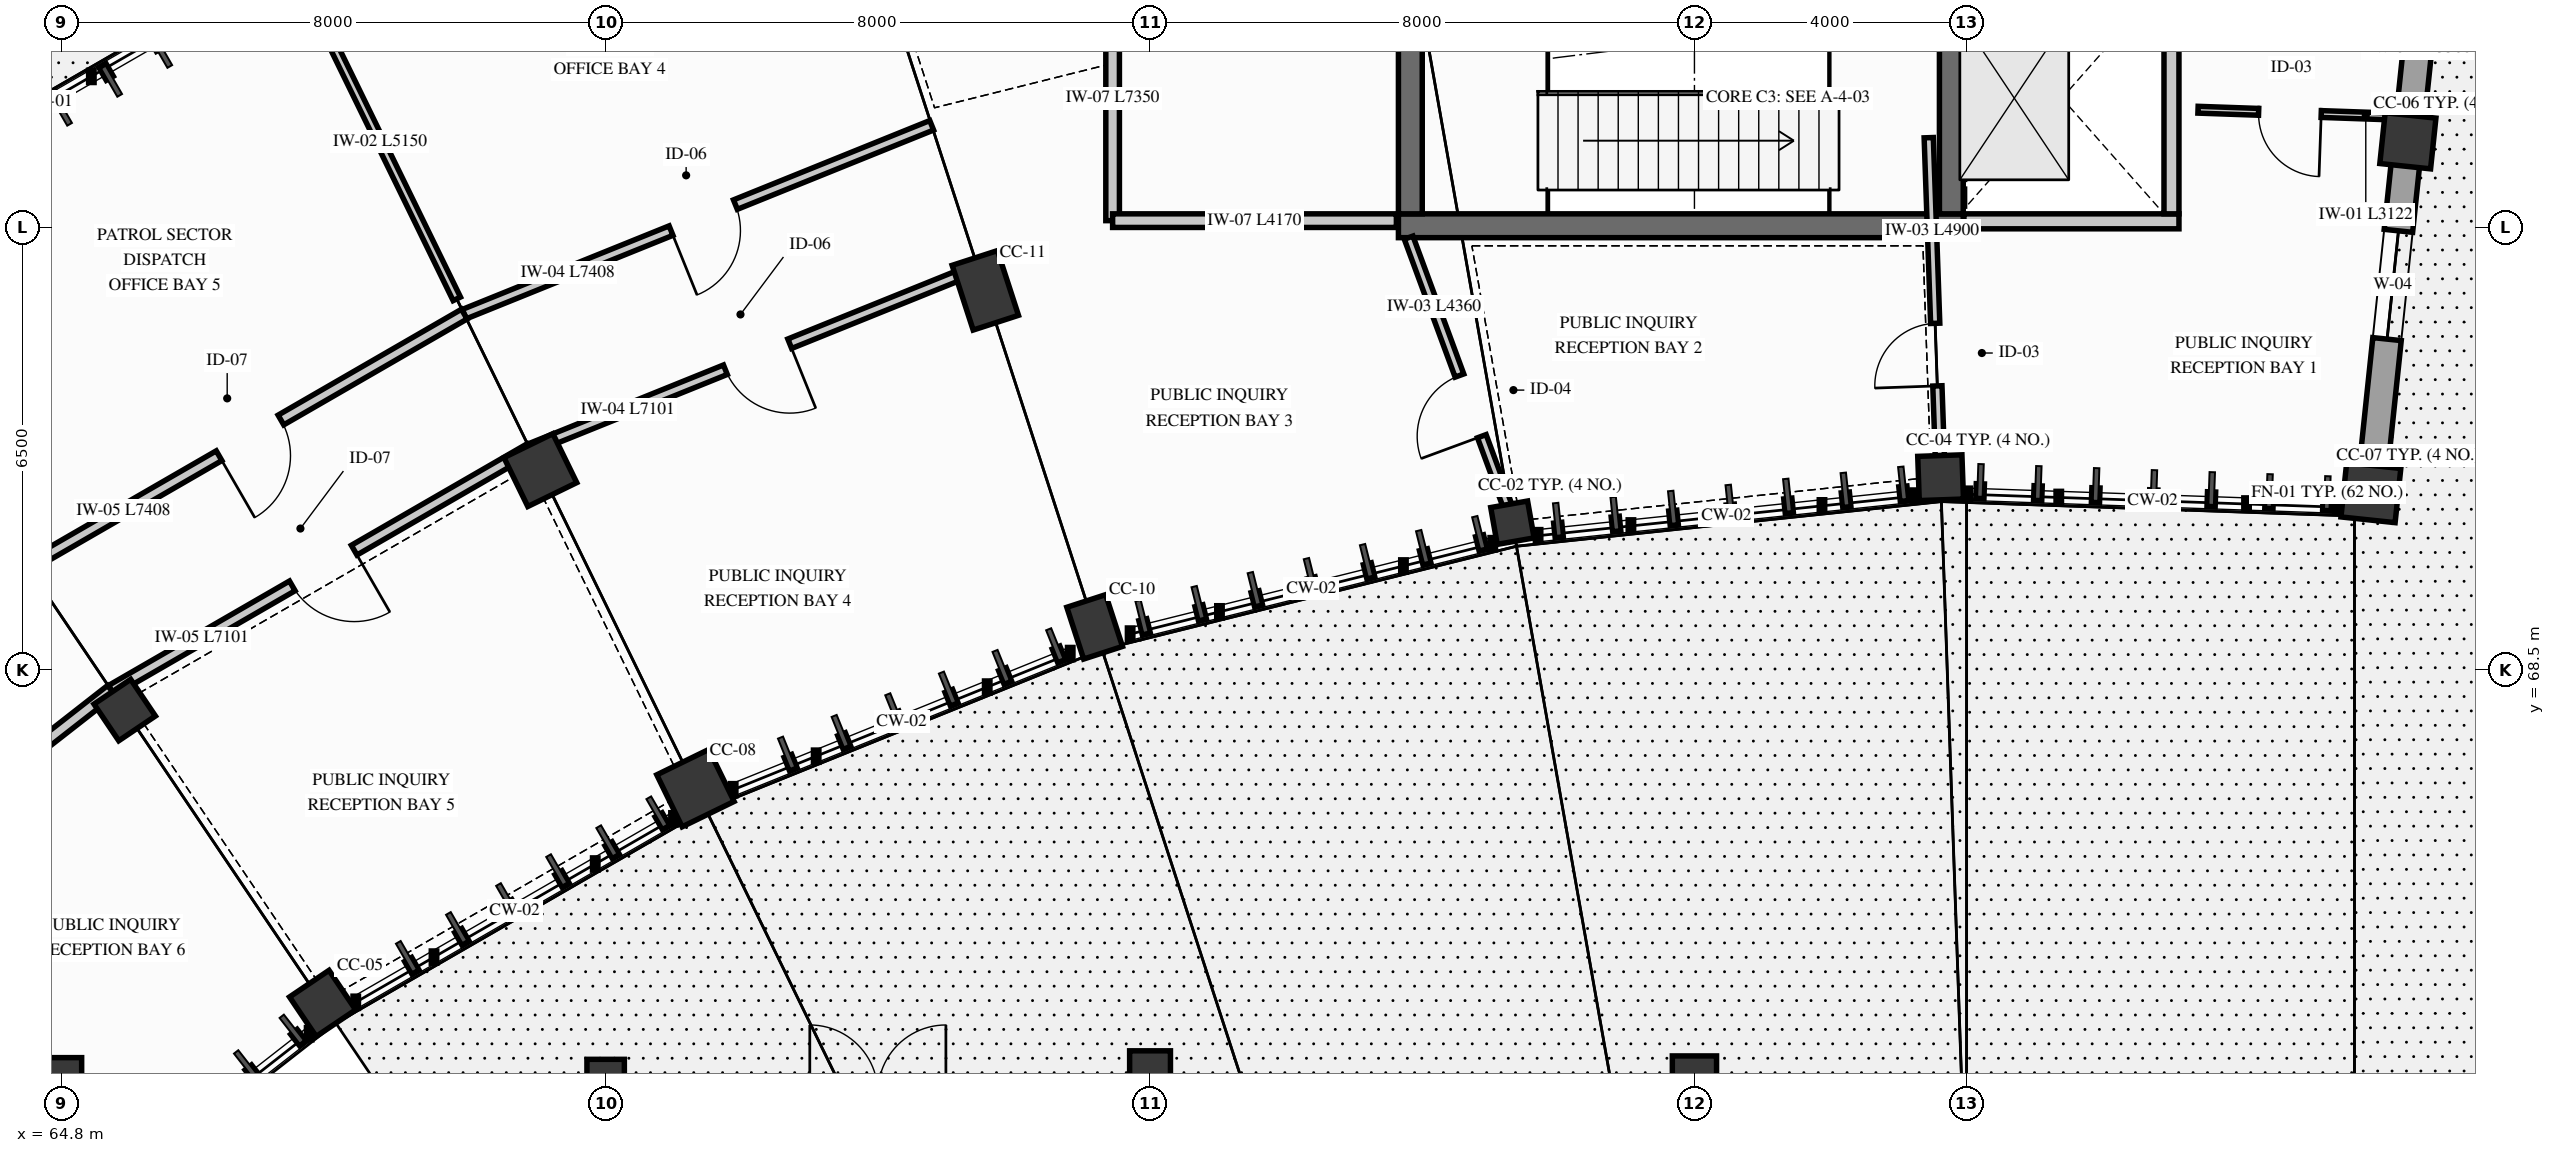
"""IFC4 building model, lengths in metres.
Left out: names, types, materials, properties, quantities, classifications, styles, units other than length and angle.
Written with IfcOpenShell. Run it as: python <this file> out.ifc"""

import sys

from ifc_helpers import new_model, si_unit, direction, frame, frame_2d, origin, origin_2d, place, context, subcontext, project, spatial, rectangle, extrude, element, fill, save


model = new_model("IFC4")
c1 = context("Model", 3, precision=1e-05, world=origin(), true_north=direction((0.0, 1.0)))
c2 = subcontext(c1, "Body", "Model", "MODEL_VIEW")
j1 = project(units=[si_unit("LENGTHUNIT", "METRE"), si_unit("PLANEANGLEUNIT", "RADIAN")], contexts=[c1])
p1 = place(None, origin())
s1 = spatial("IfcSite", under=j1, at=p1, CompositionType="ELEMENT")
p2 = place(p1, origin())
s2 = spatial("IfcBuilding", under=s1, at=p2, CompositionType="ELEMENT")
p3 = place(p2, origin())
s3 = spatial("IfcBuildingStorey", under=s2, at=p3, CompositionType="ELEMENT", Elevation=0.0)
p4 = place(p3, frame((84.45, 75.025, 0.0), z_axis=(0.0, 0.0, 1.0), x_axis=(1.0, 0.0, 0.0)))
e1 = element("IfcWall", 1, at=p4, inside=s3, PredefinedType="SHEAR", context=c2, shape_type="SweptSolid", body=[
    extrude(rectangle(XDim=8.3, YDim=0.35, at=frame_2d((4.15, 0.0))), origin(), (0.0, 0.0, 1.0), 4.88),
])
p5 = place(p3, frame((84.625, 75.2, 0.0), z_axis=(0.0, 0.0, 1.0), x_axis=(0.0, 1.0, 0.0)))
e2 = element("IfcWall", 2, at=p5, inside=s3, PredefinedType="SHEAR", context=c2, shape_type="SweptSolid", body=[
    extrude(rectangle(XDim=6.8, YDim=0.35, at=frame_2d((3.4, 0.0))), origin(), (0.0, 0.0, 1.0), 4.88),
])
p6 = place(p5, frame((2.6, 0.0, 0.0)))
e3 = element("IfcOpeningElement", 3, at=p6, cuts=e2, PredefinedType="OPENING", context=c2, shape_type="SweptSolid", body=[
    extrude(rectangle(XDim=1.25, YDim=2.2, at=frame_2d((0.625, 1.1))), frame((0.0, 0.185, 0.0), z_axis=(0.0, -1.0, 0.0), x_axis=(1.0, 0.0, 0.0)), (0.0, 0.0, 1.0), 0.37),
])
p7 = place(p3, frame((92.575, 75.2, 0.0), z_axis=(0.0, 0.0, 1.0), x_axis=(0.0, 1.0, 0.0)))
e4 = element("IfcWall", 4, at=p7, inside=s3, PredefinedType="SHEAR", context=c2, shape_type="SweptSolid", body=[
    extrude(rectangle(XDim=6.8, YDim=0.35, at=frame_2d((3.4, 0.0))), origin(), (0.0, 0.0, 1.0), 4.88),
])
p8 = place(p3, frame((98.74, 71.102, 0.0), z_axis=(0.0, 0.0, 1.0), x_axis=(0.994521895368, -0.104528463268, 0.0)))
e5 = element("IfcColumn", 5, at=p8, inside=s3, PredefinedType="COLUMN", context=c2, shape_type="SweptSolid", body=[
    extrude(rectangle(XDim=0.8, YDim=0.8, at=origin_2d()), origin(), (0.0, 0.0, 1.0), 5.1),
])
p9 = place(p3, frame((99.284, 76.273, 0.0), z_axis=(0.0, 0.0, 1.0), x_axis=(0.994521895368, -0.104528463268, 0.0)))
e6 = element("IfcColumn", 6, at=p9, inside=s3, PredefinedType="COLUMN", context=c2, shape_type="SweptSolid", body=[
    extrude(rectangle(XDim=0.75, YDim=0.75, at=origin_2d()), origin(), (0.0, 0.0, 1.0), 5.1),
])
p10 = place(p3, frame((92.417, 71.323, 0.0), z_axis=(0.0, 0.0, 1.0), x_axis=(0.999390827019, 0.034899496703, 0.0)))
e7 = element("IfcColumn", 7, at=p10, inside=s3, PredefinedType="COLUMN", context=c2, shape_type="SweptSolid", body=[
    extrude(rectangle(XDim=0.65, YDim=0.65, at=origin_2d()), origin(), (0.0, 0.0, 1.0), 5.1),
])
p11 = place(p3, frame((86.125, 70.661, 0.0), z_axis=(0.0, 0.0, 1.0), x_axis=(0.984807753012, 0.173648177667, 0.0)))
e8 = element("IfcColumn", 8, at=p11, inside=s3, PredefinedType="COLUMN", context=c2, shape_type="SweptSolid", body=[
    extrude(rectangle(XDim=0.55, YDim=0.55, at=origin_2d()), origin(), (0.0, 0.0, 1.0), 5.1),
])
p12 = place(p3, frame((79.986, 69.13, 0.0), z_axis=(0.0, 0.0, 1.0), x_axis=(0.951056516295, 0.309016994375, 0.0)))
e9 = element("IfcColumn", 9, at=p12, inside=s3, PredefinedType="COLUMN", context=c2, shape_type="SweptSolid", body=[
    extrude(rectangle(XDim=0.6, YDim=0.8, at=origin_2d()), origin(), (0.0, 0.0, 1.0), 5.1),
])
p13 = place(p3, frame((78.379, 74.076, 0.0), z_axis=(0.0, 0.0, 1.0), x_axis=(0.951056516295, 0.309016994375, 0.0)))
e10 = element("IfcColumn", 10, at=p13, inside=s3, PredefinedType="COLUMN", context=c2, shape_type="SweptSolid", body=[
    extrude(rectangle(XDim=0.7, YDim=1.0, at=origin_2d()), origin(), (0.0, 0.0, 1.0), 5.1),
])
p14 = place(p3, frame((74.12, 66.76, 0.0), z_axis=(0.0, 0.0, 1.0), x_axis=(0.898794046299, 0.438371146789, 0.0)))
e11 = element("IfcColumn", 11, at=p14, inside=s3, PredefinedType="COLUMN", context=c2, shape_type="SweptSolid", body=[
    extrude(rectangle(XDim=0.85, YDim=0.85, at=origin_2d()), origin(), (0.0, 0.0, 1.0), 5.1),
])
p15 = place(p3, frame((71.84, 71.434, 0.0), z_axis=(0.0, 0.0, 1.0), x_axis=(0.898794046299, 0.438371146789, 0.0)))
e12 = element("IfcColumn", 12, at=p15, inside=s3, PredefinedType="COLUMN", context=c2, shape_type="SweptSolid", body=[
    extrude(rectangle(XDim=0.8, YDim=0.8, at=origin_2d()), origin(), (0.0, 0.0, 1.0), 5.1),
])
p16 = place(p3, frame((68.641, 63.597, 0.0), z_axis=(0.0, 0.0, 1.0), x_axis=(0.829037572555, 0.559192903471, 0.0)))
e13 = element("IfcColumn", 13, at=p16, inside=s3, PredefinedType="COLUMN", context=c2, shape_type="SweptSolid", body=[
    extrude(rectangle(XDim=0.7, YDim=0.7, at=origin_2d()), origin(), (0.0, 0.0, 1.0), 5.1),
])
for number, where, z_axis, x_axis in (
    (14, (65.733, 67.908, 0.0), (0.0, 0.0, 1.0), (0.829, 0.559, 0.0)),
    (15, (88.8, 62.5, 0.0), (0.0, 0.0, 1.0), (1.0, 0.0, 0.0)),
):
    element("IfcColumn", number, at=place(p3, frame(where, z_axis=z_axis, x_axis=x_axis)), inside=s3, PredefinedType="COLUMN", context=c2, shape_type="SweptSolid", body=[
        extrude(rectangle(XDim=0.65, YDim=0.65, at=origin_2d()), origin(), (0.0, 0.0, 1.0), 5.1),
    ])
p17 = place(p3, frame((72.8, 62.5, 0.0), z_axis=(0.0, 0.0, 1.0), x_axis=(1.0, 0.0, 0.0)))
e16 = element("IfcColumn", 16, at=p17, inside=s3, PredefinedType="COLUMN", context=c2, shape_type="SweptSolid", body=[
    extrude(rectangle(XDim=0.55, YDim=0.55, at=origin_2d()), origin(), (0.0, 0.0, 1.0), 4.84),
])
p18 = place(p3, frame((80.8, 62.5, 0.0), z_axis=(0.0, 0.0, 1.0), x_axis=(1.0, 0.0, 0.0)))
e17 = element("IfcColumn", 17, at=p18, inside=s3, PredefinedType="COLUMN", context=c2, shape_type="SweptSolid", body=[
    extrude(rectangle(XDim=0.6, YDim=0.8, at=origin_2d()), origin(), (0.0, 0.0, 1.0), 4.84),
])
p19 = place(p3, frame((64.8, 62.5, 0.0), z_axis=(0.0, 0.0, 1.0), x_axis=(1.0, 0.0, 0.0)))
e18 = element("IfcColumn", 18, at=p19, inside=s3, PredefinedType="COLUMN", context=c2, shape_type="SweptSolid", body=[
    extrude(rectangle(XDim=0.6, YDim=0.6, at=origin_2d()), origin(), (0.0, 0.0, 1.0), 5.1),
])
p20 = place(p3, frame((98.727, 70.972, 0.0), z_axis=(0.0, 0.0, 1.0), x_axis=(0.104534827036, 0.994521226489, 0.0)))
e19 = element("IfcWall", 19, at=p20, inside=s3, PredefinedType="SOLIDWALL", context=c2, shape_type="SweptSolid", body=[
    extrude(rectangle(XDim=13.56, YDim=0.42, at=frame_2d((6.78, 0.0))), origin(), (0.0, 0.0, 1.0), 4.43),
])
p21 = place(p20, frame((2.4, 0.0, 0.9)))
e20 = element("IfcOpeningElement", 20, at=p21, cuts=e19, PredefinedType="OPENING", context=c2, shape_type="SweptSolid", body=[
    extrude(rectangle(XDim=1.6, YDim=2.4, at=frame_2d((0.8, 1.2))), frame((0.0, 0.22, 0.0), z_axis=(0.0, -1.0, 0.0), x_axis=(1.0, 0.0, 0.0)), (0.0, 0.0, 1.0), 0.44),
])
p22 = place(p20, frame((9.4, 0.0, 0.9)))
e21 = element("IfcOpeningElement", 21, at=p22, cuts=e19, PredefinedType="OPENING", context=c2, shape_type="SweptSolid", body=[
    extrude(rectangle(XDim=1.6, YDim=2.4, at=frame_2d((0.8, 1.2))), frame((0.0, 0.22, 0.0), z_axis=(0.0, -1.0, 0.0), x_axis=(1.0, 0.0, 0.0)), (0.0, 0.0, 1.0), 0.44),
])
p23 = place(p3, frame((92.76, 75.09, 0.0), z_axis=(0.0, 0.0, 1.0), x_axis=(1.0, 0.0, 0.0)))
e22 = element("IfcWall", 22, at=p23, inside=s3, PredefinedType="PARTITIONING", context=c2, shape_type="SweptSolid", body=[
    extrude(rectangle(XDim=3.16, YDim=0.22, at=frame_2d((1.58, 0.0))), origin(), (0.0, 0.0, 1.0), 4.86),
])
p24 = place(p3, frame((95.81, 75.2, 0.0), z_axis=(0.0, 0.0, 1.0), x_axis=(0.0, 1.0, 0.0)))
e23 = element("IfcWall", 23, at=p24, inside=s3, PredefinedType="PARTITIONING", context=c2, shape_type="SweptSolid", body=[
    extrude(rectangle(XDim=3.4, YDim=0.22, at=frame_2d((1.7, 0.0))), origin(), (0.0, 0.0, 1.0), 4.86),
])
p25 = place(p3, frame((80.25, 75.1, 0.0), z_axis=(0.0, 0.0, 1.0), x_axis=(0.0, 1.0, 0.0)))
e24 = element("IfcWall", 24, at=p25, inside=s3, PredefinedType="PARTITIONING", context=c2, shape_type="SweptSolid", body=[
    extrude(rectangle(XDim=7.35, YDim=0.2, at=frame_2d((3.675, 0.0))), origin(), (0.0, 0.0, 1.0), 4.86),
])
p26 = place(p25, frame((3.6, 0.0, 0.0)))
e25 = element("IfcOpeningElement", 25, at=p26, cuts=e24, PredefinedType="OPENING", context=c2, shape_type="SweptSolid", body=[
    extrude(rectangle(XDim=1.25, YDim=2.2, at=frame_2d((0.625, 1.1))), frame((0.0, 0.11, 0.0), z_axis=(0.0, -1.0, 0.0), x_axis=(1.0, 0.0, 0.0)), (0.0, 0.0, 1.0), 0.22),
])
p27 = place(p3, frame((80.25, 75.1, 0.0), z_axis=(0.0, 0.0, 1.0), x_axis=(1.0, 0.0, 0.0)))
e26 = element("IfcWall", 26, at=p27, inside=s3, PredefinedType="PARTITIONING", context=c2, shape_type="SweptSolid", body=[
    extrude(rectangle(XDim=4.17, YDim=0.2, at=frame_2d((2.085, 0.0))), origin(), (0.0, 0.0, 1.0), 4.86),
])
p28 = place(p3, frame((92.414, 71.422, 0.0), z_axis=(0.0, 0.0, 1.0), x_axis=(-0.034877560821, 0.999391592796, 0.0)))
e27 = element("IfcWall", 27, at=p28, inside=s3, PredefinedType="PARTITIONING", context=c2, shape_type="SweptSolid", body=[
    extrude(rectangle(XDim=4.9, YDim=0.135, at=frame_2d((2.45, 0.0))), origin(), (0.0, 0.0, 1.0), 4.86),
])
p29 = place(p28, frame((1.25, 0.0, 0.0)))
e28 = element("IfcOpeningElement", 28, at=p29, cuts=e27, PredefinedType="OPENING", context=c2, shape_type="SweptSolid", body=[
    extrude(rectangle(XDim=0.92, YDim=2.12, at=frame_2d((0.46, 1.06))), frame((0.0, 0.077, 0.0), z_axis=(0.0, -1.0, 0.0), x_axis=(1.0, 0.0, 0.0)), (0.0, 0.0, 1.0), 0.155),
])
p30 = place(p3, frame((86.108, 70.76, 0.0), z_axis=(0.0, 0.0, 1.0), x_axis=(-0.345809164341, 0.938304866159, 0.0)))
e29 = element("IfcWall", 29, at=p30, inside=s3, PredefinedType="PARTITIONING", context=c2, shape_type="SweptSolid", body=[
    extrude(rectangle(XDim=4.36, YDim=0.135, at=frame_2d((2.18, 0.0))), origin(), (0.0, 0.0, 1.0), 4.86),
])
p31 = place(p30, frame((1.25, 0.0, 0.0)))
e30 = element("IfcOpeningElement", 30, at=p31, cuts=e29, PredefinedType="OPENING", context=c2, shape_type="SweptSolid", body=[
    extrude(rectangle(XDim=0.95, YDim=2.15, at=frame_2d((0.475, 1.075))), frame((0.0, 0.077, 0.0), z_axis=(0.0, -1.0, 0.0), x_axis=(1.0, 0.0, 0.0)), (0.0, 0.0, 1.0), 0.155),
])
p32 = place(p3, frame((99.321, 76.621, 0.0), z_axis=(0.0, 0.0, 1.0), x_axis=(-0.999389073029, 0.034949688284, 0.0)))
e31 = element("IfcWall", 31, at=p32, inside=s3, PredefinedType="PARTITIONING", context=c2, shape_type="SweptSolid", body=[
    extrude(rectangle(XDim=3.123, YDim=0.1, at=frame_2d((1.561, 0.0))), origin(), (0.0, 0.0, 1.0), 4.86),
])
p33 = place(p32, frame((1.311, 0.0, 0.0)))
e32 = element("IfcOpeningElement", 32, at=p33, cuts=e31, PredefinedType="OPENING", context=c2, shape_type="SweptSolid", body=[
    extrude(rectangle(XDim=0.92, YDim=2.12, at=frame_2d((0.46, 1.06))), frame((0.0, 0.06, 0.0), z_axis=(0.0, -1.0, 0.0), x_axis=(1.0, 0.0, 0.0)), (0.0, 0.0, 1.0), 0.12),
])
p34 = place(p3, frame((78.271, 74.409, 0.0), z_axis=(0.0, 0.0, 1.0), x_axis=(-0.927181218568, -0.374613117677, 0.0)))
e33 = element("IfcWall", 33, at=p34, inside=s3, PredefinedType="PARTITIONING", context=c2, shape_type="SweptSolid", body=[
    extrude(rectangle(XDim=7.101, YDim=0.15, at=frame_2d((3.551, 0.0))), origin(), (0.0, 0.0, 1.0), 4.86),
])
p35 = place(p34, frame((2.983, 0.0, 0.0)))
e34 = element("IfcOpeningElement", 34, at=p35, cuts=e33, PredefinedType="OPENING", context=c2, shape_type="SweptSolid", body=[
    extrude(rectangle(XDim=1.02, YDim=2.18, at=frame_2d((0.51, 1.09))), frame((0.0, 0.085, 0.0), z_axis=(0.0, -1.0, 0.0), x_axis=(1.0, 0.0, 0.0)), (0.0, 0.0, 1.0), 0.17),
])
p36 = place(p3, frame((77.591, 76.501, 0.0), z_axis=(0.0, 0.0, 1.0), x_axis=(-0.927187035022, -0.374598721418, 0.0)))
e35 = element("IfcWall", 35, at=p36, inside=s3, PredefinedType="PARTITIONING", context=c2, shape_type="SweptSolid", body=[
    extrude(rectangle(XDim=7.408, YDim=0.15, at=frame_2d((3.704, 0.0))), origin(), (0.0, 0.0, 1.0), 4.86),
])
p37 = place(p36, frame((3.111, 0.0, 0.0)))
e36 = element("IfcOpeningElement", 36, at=p37, cuts=e35, PredefinedType="OPENING", context=c2, shape_type="SweptSolid", body=[
    extrude(rectangle(XDim=1.02, YDim=2.18, at=frame_2d((0.51, 1.09))), frame((0.0, 0.085, 0.0), z_axis=(0.0, -1.0, 0.0), x_axis=(1.0, 0.0, 0.0)), (0.0, 0.0, 1.0), 0.17),
])
p38 = place(p3, frame((70.613, 73.951, 0.0), z_axis=(0.0, 0.0, 1.0), x_axis=(-0.438355450259, 0.898801701839, 0.0)))
e37 = element("IfcWall", 37, at=p38, inside=s3, PredefinedType="PARTITIONING", context=c2, shape_type="SweptSolid", body=[
    extrude(rectangle(XDim=5.15, YDim=0.12, at=frame_2d((2.575, 0.0))), origin(), (0.0, 0.0, 1.0), 4.43),
])
p39 = place(p3, frame((71.687, 71.749, 0.0), z_axis=(0.0, 0.0, 1.0), x_axis=(-0.866032151687, -0.499988312107, 0.0)))
e38 = element("IfcWall", 38, at=p39, inside=s3, PredefinedType="PARTITIONING", context=c2, shape_type="SweptSolid", body=[
    extrude(rectangle(XDim=7.101, YDim=0.165, at=frame_2d((3.551, 0.0))), origin(), (0.0, 0.0, 1.0), 4.86),
])
p40 = place(p39, frame((2.982, 0.0, 0.0)))
e39 = element("IfcOpeningElement", 39, at=p40, cuts=e38, PredefinedType="OPENING", context=c2, shape_type="SweptSolid", body=[
    extrude(rectangle(XDim=1.05, YDim=2.2, at=frame_2d((0.525, 1.1))), frame((0.0, 0.093, 0.0), z_axis=(0.0, -1.0, 0.0), x_axis=(1.0, 0.0, 0.0)), (0.0, 0.0, 1.0), 0.185),
])
p41 = place(p3, frame((70.722, 73.726, 0.0), z_axis=(0.0, 0.0, 1.0), x_axis=(-0.866019843608, -0.500009630384, 0.0)))
e40 = element("IfcWall", 40, at=p41, inside=s3, PredefinedType="PARTITIONING", context=c2, shape_type="SweptSolid", body=[
    extrude(rectangle(XDim=7.408, YDim=0.165, at=frame_2d((3.704, 0.0))), origin(), (0.0, 0.0, 1.0), 4.86),
])
p42 = place(p41, frame((3.111, 0.0, 0.0)))
e41 = element("IfcOpeningElement", 41, at=p42, cuts=e40, PredefinedType="OPENING", context=c2, shape_type="SweptSolid", body=[
    extrude(rectangle(XDim=1.05, YDim=2.2, at=frame_2d((0.525, 1.1))), frame((0.0, 0.093, 0.0), z_axis=(0.0, -1.0, 0.0), x_axis=(1.0, 0.0, 0.0)), (0.0, 0.0, 1.0), 0.185),
])
p43 = place(p3, frame((65.537, 68.198, 0.0), z_axis=(0.0, 0.0, 1.0), x_axis=(-0.788011863809, -0.615660054329, 0.0)))
e42 = element("IfcWall", 42, at=p43, inside=s3, PredefinedType="PARTITIONING", context=c2, shape_type="SweptSolid", body=[
    extrude(rectangle(XDim=7.101, YDim=0.18, at=frame_2d((3.551, 0.0))), origin(), (0.0, 0.0, 1.0), 4.86),
])
p44 = place(p43, frame((2.982, 0.0, 0.0)))
e43 = element("IfcOpeningElement", 43, at=p44, cuts=e42, PredefinedType="OPENING", context=c2, shape_type="SweptSolid", body=[
    extrude(rectangle(XDim=1.08, YDim=2.22, at=frame_2d((0.54, 1.11))), frame((0.0, 0.1, 0.0), z_axis=(0.0, -1.0, 0.0), x_axis=(1.0, 0.0, 0.0)), (0.0, 0.0, 1.0), 0.2),
])
p45 = place(p21, origin())
e44 = element("IfcWindow", 44, at=p45, inside=s3, PartitioningType="SINGLE_PANEL", PredefinedType="WINDOW", context=c2, shape_type="SweptSolid", body=[
    extrude(rectangle(XDim=1.6, YDim=2.4, at=frame_2d((0.8, 1.2))), frame((0.0, 0.03, 0.0), z_axis=(0.0, -1.0, 0.0), x_axis=(1.0, 0.0, 0.0)), (0.0, 0.0, 1.0), 0.06),
])
fill(e20, e44)
p46 = place(p29, origin())
e45 = element("IfcDoor", 45, at=p46, inside=s3, OperationType="SINGLE_SWING_LEFT", PredefinedType="DOOR", context=c2, shape_type="SweptSolid", body=[
    extrude(rectangle(XDim=0.92, YDim=2.12, at=frame_2d((0.46, 1.06))), frame((0.0, 0.025, 0.0), z_axis=(0.0, -1.0, 0.0), x_axis=(1.0, 0.0, 0.0)), (0.0, 0.0, 1.0), 0.05),
])
fill(e28, e45)
p47 = place(p31, origin())
e46 = element("IfcDoor", 46, at=p47, inside=s3, OperationType="SINGLE_SWING_LEFT", PredefinedType="DOOR", context=c2, shape_type="SweptSolid", body=[
    extrude(rectangle(XDim=0.95, YDim=2.15, at=frame_2d((0.475, 1.075))), frame((0.0, 0.025, 0.0), z_axis=(0.0, -1.0, 0.0), x_axis=(1.0, 0.0, 0.0)), (0.0, 0.0, 1.0), 0.05),
])
fill(e30, e46)
p48 = place(p33, origin())
e47 = element("IfcDoor", 47, at=p48, inside=s3, OperationType="SINGLE_SWING_LEFT", PredefinedType="DOOR", context=c2, shape_type="SweptSolid", body=[
    extrude(rectangle(XDim=0.92, YDim=2.12, at=frame_2d((0.46, 1.06))), frame((0.0, 0.025, 0.0), z_axis=(0.0, -1.0, 0.0), x_axis=(1.0, 0.0, 0.0)), (0.0, 0.0, 1.0), 0.05),
])
fill(e32, e47)
p49 = place(p35, origin())
e48 = element("IfcDoor", 48, at=p49, inside=s3, OperationType="SINGLE_SWING_LEFT", PredefinedType="DOOR", context=c2, shape_type="SweptSolid", body=[
    extrude(rectangle(XDim=1.02, YDim=2.18, at=frame_2d((0.51, 1.09))), frame((0.0, 0.025, 0.0), z_axis=(0.0, -1.0, 0.0), x_axis=(1.0, 0.0, 0.0)), (0.0, 0.0, 1.0), 0.05),
])
fill(e34, e48)
p50 = place(p37, origin())
e49 = element("IfcDoor", 49, at=p50, inside=s3, OperationType="SINGLE_SWING_RIGHT", PredefinedType="DOOR", context=c2, shape_type="SweptSolid", body=[
    extrude(rectangle(XDim=1.02, YDim=2.18, at=frame_2d((0.51, 1.09))), frame((0.0, 0.025, 0.0), z_axis=(0.0, -1.0, 0.0), x_axis=(1.0, 0.0, 0.0)), (0.0, 0.0, 1.0), 0.05),
])
fill(e36, e49)
p51 = place(p40, origin())
e50 = element("IfcDoor", 50, at=p51, inside=s3, OperationType="SINGLE_SWING_LEFT", PredefinedType="DOOR", context=c2, shape_type="SweptSolid", body=[
    extrude(rectangle(XDim=1.05, YDim=2.2, at=frame_2d((0.525, 1.1))), frame((0.0, 0.025, 0.0), z_axis=(0.0, -1.0, 0.0), x_axis=(1.0, 0.0, 0.0)), (0.0, 0.0, 1.0), 0.05),
])
fill(e39, e50)
p52 = place(p42, origin())
e51 = element("IfcDoor", 51, at=p52, inside=s3, OperationType="SINGLE_SWING_RIGHT", PredefinedType="DOOR", context=c2, shape_type="SweptSolid", body=[
    extrude(rectangle(XDim=1.05, YDim=2.2, at=frame_2d((0.525, 1.1))), frame((0.0, 0.025, 0.0), z_axis=(0.0, -1.0, 0.0), x_axis=(1.0, 0.0, 0.0)), (0.0, 0.0, 1.0), 0.05),
])
fill(e41, e51)
save(model, sys.argv[1])
